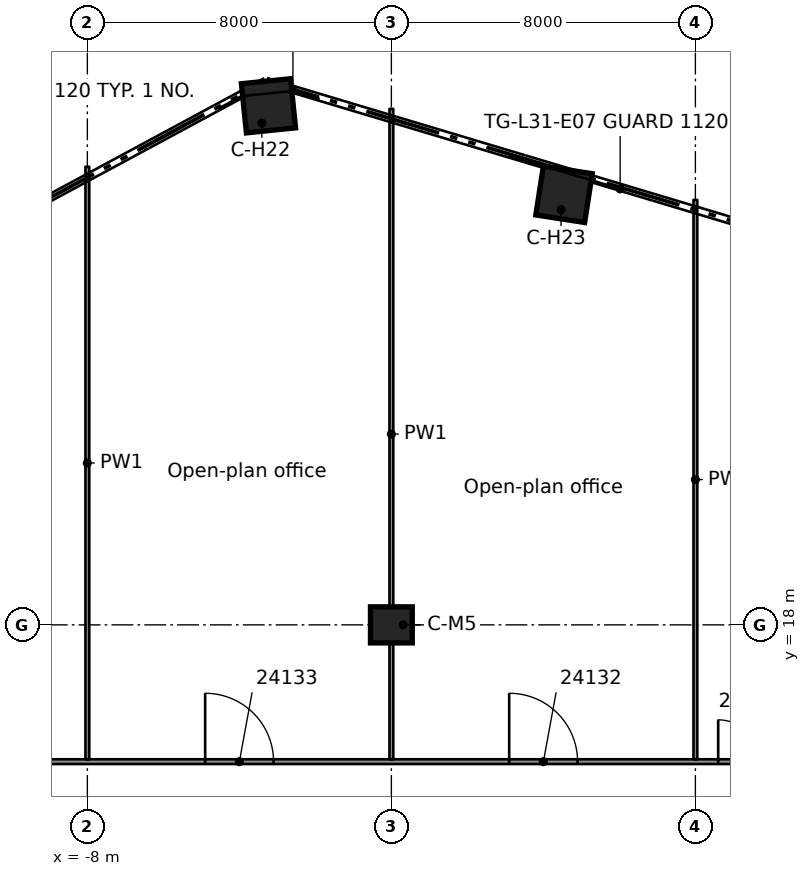
"""IFC4 building model, lengths in metres.
Left out: names, types, materials, properties, quantities, classifications, styles, units other than length and angle.
Written with IfcOpenShell. Run it as: python <this file> out.ifc"""

import sys

from ifc_helpers import new_model, si_unit, direction, frame, frame_2d, origin, origin_2d, place, context, subcontext, project, spatial, rectangle, extrude, element, fill, save


model = new_model("IFC4")
c1 = context("Model", 3, precision=1e-05, world=origin(), true_north=direction((0.0, 1.0)))
c2 = subcontext(c1, "Body", "Model", "MODEL_VIEW")
j1 = project(units=[si_unit("LENGTHUNIT", "METRE"), si_unit("PLANEANGLEUNIT", "RADIAN")], contexts=[c1])
p1 = place(None, origin())
s1 = spatial("IfcSite", under=j1, at=p1, CompositionType="ELEMENT")
p2 = place(p1, origin())
s2 = spatial("IfcBuilding", under=s1, at=p2, CompositionType="ELEMENT")
p3 = place(p2, frame((0.0, 0.0, 123.7)))
s3 = spatial("IfcBuildingStorey", under=s2, at=p3, CompositionType="ELEMENT", Elevation=123.7)
for number, where, z_axis, x_axis in (
    (1, (-3.234, 31.658, 0.0), (0.0, 0.0, 1.0), (-0.102, 0.995, 0.0)),
    (2, (4.543, 29.329, 0.0), (0.0, 0.0, 1.0), (0.153, 0.988, 0.0)),
):
    element("IfcColumn", number, at=place(p3, frame(where, z_axis=z_axis, x_axis=x_axis)), inside=s3, PredefinedType="COLUMN", context=c2, shape_type="SweptSolid", body=[
        extrude(rectangle(XDim=1.3, YDim=1.3, at=origin_2d()), origin(), (0.0, 0.0, 1.0), 3.5),
    ])
p4 = place(p3, frame((0.0, 18.0, 0.0), z_axis=(0.0, 0.0, 1.0), x_axis=(1.0, 0.0, 0.0)))
e3 = element("IfcColumn", 3, at=p4, inside=s3, PredefinedType="COLUMN", context=c2, shape_type="SweptSolid", body=[
    extrude(rectangle(XDim=1.1, YDim=0.95, at=origin_2d()), origin(), (0.0, 0.0, 1.0), 3.5),
])
p5 = place(p3, frame((-10.39, 14.401, 0.0), z_axis=(0.0, 0.0, 1.0), x_axis=(1.0, 0.0, 0.0)))
e4 = element("IfcWall", 4, at=p5, inside=s3, PredefinedType="PARTITIONING", context=c2, shape_type="SweptSolid", body=[
    extrude(rectangle(XDim=20.781, YDim=0.125, at=frame_2d((10.391, 0.0))), origin(), (0.0, 0.0, 1.0), 3.08),
])
p6 = place(p5, frame((18.99, 0.0, 0.0)))
e5 = element("IfcOpeningElement", 5, at=p6, cuts=e4, PredefinedType="OPENING", context=c2, shape_type="SweptSolid", body=[
    extrude(rectangle(XDim=1.1, YDim=2.1, at=frame_2d((0.55, 1.05))), frame((0.0, 0.073, 0.0), z_axis=(0.0, -1.0, 0.0), x_axis=(1.0, 0.0, 0.0)), (0.0, 0.0, 1.0), 0.145),
])
p7 = place(p5, frame((13.49, 0.0, 0.0)))
e6 = element("IfcOpeningElement", 6, at=p7, cuts=e4, PredefinedType="OPENING", context=c2, shape_type="SweptSolid", body=[
    extrude(rectangle(XDim=1.8, YDim=2.1, at=frame_2d((0.9, 1.05))), frame((0.0, 0.073, 0.0), z_axis=(0.0, -1.0, 0.0), x_axis=(1.0, 0.0, 0.0)), (0.0, 0.0, 1.0), 0.145),
])
p8 = place(p5, frame((5.49, 0.0, 0.0)))
e7 = element("IfcOpeningElement", 7, at=p8, cuts=e4, PredefinedType="OPENING", context=c2, shape_type="SweptSolid", body=[
    extrude(rectangle(XDim=1.8, YDim=2.1, at=frame_2d((0.9, 1.05))), frame((0.0, 0.073, 0.0), z_axis=(0.0, -1.0, 0.0), x_axis=(1.0, 0.0, 0.0)), (0.0, 0.0, 1.0), 0.145),
])
p9 = place(p3, frame((8.0, 14.463, 0.0), z_axis=(0.0, 0.0, 1.0), x_axis=(0.0, 1.0, 0.0)))
e8 = element("IfcWall", 8, at=p9, inside=s3, PredefinedType="PARTITIONING", context=c2, shape_type="SweptSolid", body=[
    extrude(rectangle(XDim=14.719, YDim=0.1, at=frame_2d((7.359, 0.0))), origin(), (0.0, 0.0, 1.0), 3.08),
])
p10 = place(p3, frame((0.0, 14.463, 0.0), z_axis=(0.0, 0.0, 1.0), x_axis=(0.0, 1.0, 0.0)))
e9 = element("IfcWall", 9, at=p10, inside=s3, PredefinedType="PARTITIONING", context=c2, shape_type="SweptSolid", body=[
    extrude(rectangle(XDim=17.114, YDim=0.1, at=frame_2d((8.557, 0.0))), origin(), (0.0, 0.0, 1.0), 3.08),
])
p11 = place(p3, frame((-8.0, 14.463, 0.0), z_axis=(0.0, 0.0, 1.0), x_axis=(0.0, 1.0, 0.0)))
e10 = element("IfcWall", 10, at=p11, inside=s3, PredefinedType="PARTITIONING", context=c2, shape_type="SweptSolid", body=[
    extrude(rectangle(XDim=15.591, YDim=0.1, at=frame_2d((7.795, 0.0))), origin(), (0.0, 0.0, 1.0), 3.08),
])
p12 = place(p6, origin())
e11 = element("IfcDoor", 11, at=p12, inside=s3, OperationType="SINGLE_SWING_RIGHT", PredefinedType="DOOR", context=c2, shape_type="SweptSolid", body=[
    extrude(rectangle(XDim=1.1, YDim=2.1, at=frame_2d((0.55, 1.05))), frame((0.0, 0.025, 0.0), z_axis=(0.0, -1.0, 0.0), x_axis=(1.0, 0.0, 0.0)), (0.0, 0.0, 1.0), 0.05),
])
fill(e5, e11)
p13 = place(p7, origin())
e12 = element("IfcDoor", 12, at=p13, inside=s3, OperationType="DOUBLE_DOOR_SINGLE_SWING", PredefinedType="DOOR", context=c2, shape_type="SweptSolid", body=[
    extrude(rectangle(XDim=1.8, YDim=2.1, at=frame_2d((0.9, 1.05))), frame((0.0, 0.025, 0.0), z_axis=(0.0, -1.0, 0.0), x_axis=(1.0, 0.0, 0.0)), (0.0, 0.0, 1.0), 0.05),
])
fill(e6, e12)
p14 = place(p8, origin())
e13 = element("IfcDoor", 13, at=p14, inside=s3, OperationType="DOUBLE_DOOR_SINGLE_SWING", PredefinedType="DOOR", context=c2, shape_type="SweptSolid", body=[
    extrude(rectangle(XDim=1.8, YDim=2.1, at=frame_2d((0.9, 1.05))), frame((0.0, 0.025, 0.0), z_axis=(0.0, -1.0, 0.0), x_axis=(1.0, 0.0, 0.0)), (0.0, 0.0, 1.0), 0.05),
])
fill(e7, e13)
save(model, sys.argv[1])
